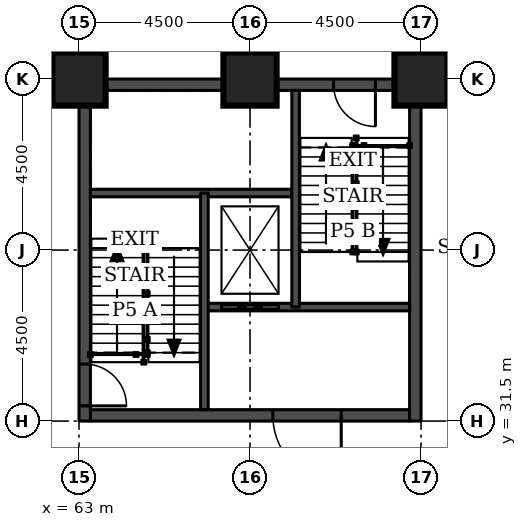
"""IFC4 building model, lengths in metres.
Left out: names, types, materials, properties, quantities, classifications, styles, units other than length and angle.
Written with IfcOpenShell. Run it as: python <this file> out.ifc"""

import sys

from ifc_helpers import new_model, si_unit, direction, frame, frame_2d, origin, origin_2d, place, context, subcontext, project, spatial, rectangle, extrude, element, fill, save


model = new_model("IFC4")
c1 = context("Model", 3, precision=1e-05, world=origin(), true_north=direction((0.0, 1.0)))
c2 = subcontext(c1, "Body", "Model", "MODEL_VIEW")
j1 = project(units=[si_unit("LENGTHUNIT", "METRE"), si_unit("PLANEANGLEUNIT", "RADIAN")], contexts=[c1])
p1 = place(None, origin())
s1 = spatial("IfcSite", under=j1, at=p1, CompositionType="ELEMENT")
p2 = place(p1, origin())
s2 = spatial("IfcBuilding", under=s1, at=p2, CompositionType="ELEMENT")
p3 = place(p2, frame((0.0, 0.0, -4.5)))
s3 = spatial("IfcBuildingStorey", under=s2, at=p3, CompositionType="ELEMENT", Elevation=-4.5)
for number, where, z_axis, x_axis in (
    (1, (63.0, 40.5, 0.0), (0.0, 0.0, 1.0), (1.0, 0.0, 0.0)),
    (2, (67.5, 40.5, 0.0), (0.0, 0.0, 1.0), (1.0, 0.0, 0.0)),
    (3, (72.0, 40.5, 0.0), (0.0, 0.0, 1.0), (1.0, 0.0, 0.0)),
):
    element("IfcColumn", number, at=place(p3, frame(where, z_axis=z_axis, x_axis=x_axis)), inside=s3, PredefinedType="COLUMN", context=c2, shape_type="SweptSolid", body=[
        extrude(rectangle(XDim=1.4, YDim=1.4, at=origin_2d()), origin(), (0.0, 0.0, 1.0), 4.5),
    ])
p4 = place(p3, frame((63.3, 31.65, 0.0), z_axis=(0.0, 0.0, 1.0), x_axis=(1.0, 0.0, 0.0)))
e4 = element("IfcWall", 4, at=p4, inside=s3, PredefinedType="SHEAR", context=c2, shape_type="SweptSolid", body=[
    extrude(rectangle(XDim=8.4, YDim=0.3, at=frame_2d((4.2, 0.0))), origin(), (0.0, 0.0, 1.0), 4.5),
])
p5 = place(p4, frame((4.8, 0.0, 0.0)))
e5 = element("IfcOpeningElement", 5, at=p5, cuts=e4, PredefinedType="OPENING", context=c2, shape_type="SweptSolid", body=[
    extrude(rectangle(XDim=1.8, YDim=2.1, at=frame_2d((0.9, 1.05))), frame((0.0, 0.16, 0.0), z_axis=(0.0, -1.0, 0.0), x_axis=(1.0, 0.0, 0.0)), (0.0, 0.0, 1.0), 0.32),
])
p6 = place(p3, frame((63.3, 40.35, 0.0), z_axis=(0.0, 0.0, 1.0), x_axis=(1.0, 0.0, 0.0)))
e6 = element("IfcWall", 6, at=p6, inside=s3, PredefinedType="SHEAR", context=c2, shape_type="SweptSolid", body=[
    extrude(rectangle(XDim=8.4, YDim=0.3, at=frame_2d((4.2, 0.0))), origin(), (0.0, 0.0, 1.0), 4.5),
])
p7 = place(p6, frame((6.4, 0.0, 0.0)))
e7 = element("IfcOpeningElement", 7, at=p7, cuts=e6, PredefinedType="OPENING", context=c2, shape_type="SweptSolid", body=[
    extrude(rectangle(XDim=1.1, YDim=2.1, at=frame_2d((0.55, 1.05))), frame((0.0, 0.16, 0.0), z_axis=(0.0, -1.0, 0.0), x_axis=(1.0, 0.0, 0.0)), (0.0, 0.0, 1.0), 0.32),
])
p8 = place(p3, frame((63.15, 31.5, 0.0), z_axis=(0.0, 0.0, 1.0), x_axis=(0.0, 1.0, 0.0)))
e8 = element("IfcWall", 8, at=p8, inside=s3, PredefinedType="SHEAR", context=c2, shape_type="SweptSolid", body=[
    extrude(rectangle(XDim=9.0, YDim=0.3, at=frame_2d((4.5, 0.0))), origin(), (0.0, 0.0, 1.0), 4.5),
])
p9 = place(p8, frame((0.4, 0.0, 0.0)))
e9 = element("IfcOpeningElement", 9, at=p9, cuts=e8, PredefinedType="OPENING", context=c2, shape_type="SweptSolid", body=[
    extrude(rectangle(XDim=1.1, YDim=2.1, at=frame_2d((0.55, 1.05))), frame((0.0, 0.16, 0.0), z_axis=(0.0, -1.0, 0.0), x_axis=(1.0, 0.0, 0.0)), (0.0, 0.0, 1.0), 0.32),
])
p10 = place(p3, frame((71.85, 31.5, 0.0), z_axis=(0.0, 0.0, 1.0), x_axis=(0.0, 1.0, 0.0)))
e10 = element("IfcWall", 10, at=p10, inside=s3, PredefinedType="SHEAR", context=c2, shape_type="SweptSolid", body=[
    extrude(rectangle(XDim=9.0, YDim=0.3, at=frame_2d((4.5, 0.0))), origin(), (0.0, 0.0, 1.0), 4.5),
])
p11 = place(p3, frame((66.3, 34.5, 0.0), z_axis=(0.0, 0.0, 1.0), x_axis=(1.0, 0.0, 0.0)))
e11 = element("IfcWall", 11, at=p11, inside=s3, PredefinedType="SOLIDWALL", context=c2, shape_type="SweptSolid", body=[
    extrude(rectangle(XDim=5.4, YDim=0.2, at=frame_2d((2.7, 0.0))), origin(), (0.0, 0.0, 1.0), 4.1),
])
p12 = place(p11, frame((0.45, 0.0, 0.0)))
e12 = element("IfcOpeningElement", 12, at=p12, cuts=e11, PredefinedType="OPENING", context=c2, shape_type="SweptSolid", body=[
    extrude(rectangle(XDim=1.5, YDim=2.1, at=frame_2d((0.75, 1.05))), frame((0.0, 0.11, 0.0), z_axis=(0.0, -1.0, 0.0), x_axis=(1.0, 0.0, 0.0)), (0.0, 0.0, 1.0), 0.22),
])
p13 = place(p3, frame((63.3, 37.5, 0.0), z_axis=(0.0, 0.0, 1.0), x_axis=(1.0, 0.0, 0.0)))
e13 = element("IfcWall", 13, at=p13, inside=s3, PredefinedType="SOLIDWALL", context=c2, shape_type="SweptSolid", body=[
    extrude(rectangle(XDim=5.4, YDim=0.2, at=frame_2d((2.7, 0.0))), origin(), (0.0, 0.0, 1.0), 4.1),
])
for number, where, z_axis, x_axis in (
    (14, (66.3, 31.8, 0.0), (0.0, 0.0, 1.0), (0.0, 1.0, 0.0)),
    (15, (68.7, 34.5, 0.0), (0.0, 0.0, 1.0), (0.0, 1.0, 0.0)),
):
    element("IfcWall", number, at=place(p3, frame(where, z_axis=z_axis, x_axis=x_axis)), inside=s3, PredefinedType="SOLIDWALL", context=c2, shape_type="SweptSolid", body=[
        extrude(rectangle(XDim=5.7, YDim=0.2, at=frame_2d((2.85, 0.0))), origin(), (0.0, 0.0, 1.0), 4.1),
    ])
p14 = place(p9, frame((1.1, 0.0, 0.0), z_axis=(0.0, 0.0, 1.0), x_axis=(-1.0, 0.0, 0.0)))
e16 = element("IfcDoor", 16, at=p14, inside=s3, OperationType="SINGLE_SWING_RIGHT", PredefinedType="DOOR", context=c2, shape_type="SweptSolid", body=[
    extrude(rectangle(XDim=1.1, YDim=2.1, at=frame_2d((0.55, 1.05))), frame((0.0, 0.025, 0.0), z_axis=(0.0, -1.0, 0.0), x_axis=(1.0, 0.0, 0.0)), (0.0, 0.0, 1.0), 0.05),
])
fill(e9, e16)
p15 = place(p7, frame((1.1, 0.0, 0.0), z_axis=(0.0, 0.0, 1.0), x_axis=(-1.0, 0.0, 0.0)))
e17 = element("IfcDoor", 17, at=p15, inside=s3, OperationType="SINGLE_SWING_LEFT", PredefinedType="DOOR", context=c2, shape_type="SweptSolid", body=[
    extrude(rectangle(XDim=1.1, YDim=2.1, at=frame_2d((0.55, 1.05))), frame((0.0, 0.025, 0.0), z_axis=(0.0, -1.0, 0.0), x_axis=(1.0, 0.0, 0.0)), (0.0, 0.0, 1.0), 0.05),
])
fill(e7, e17)
p16 = place(p12, origin())
e18 = element("IfcDoor", 18, at=p16, inside=s3, OperationType="DOUBLE_DOOR_SLIDING", PredefinedType="DOOR", context=c2, shape_type="SweptSolid", body=[
    extrude(rectangle(XDim=1.5, YDim=2.1, at=frame_2d((0.75, 1.05))), frame((0.0, 0.025, 0.0), z_axis=(0.0, -1.0, 0.0), x_axis=(1.0, 0.0, 0.0)), (0.0, 0.0, 1.0), 0.05),
])
fill(e12, e18)
p17 = place(p5, frame((1.8, 0.0, 0.0), z_axis=(0.0, 0.0, 1.0), x_axis=(-1.0, 0.0, 0.0)))
e19 = element("IfcDoor", 19, at=p17, inside=s3, OperationType="SINGLE_SWING_LEFT", PredefinedType="DOOR", context=c2, shape_type="SweptSolid", body=[
    extrude(rectangle(XDim=1.8, YDim=2.1, at=frame_2d((0.9, 1.05))), frame((0.0, 0.025, 0.0), z_axis=(0.0, -1.0, 0.0), x_axis=(1.0, 0.0, 0.0)), (0.0, 0.0, 1.0), 0.05),
])
fill(e5, e19)
save(model, sys.argv[1])
